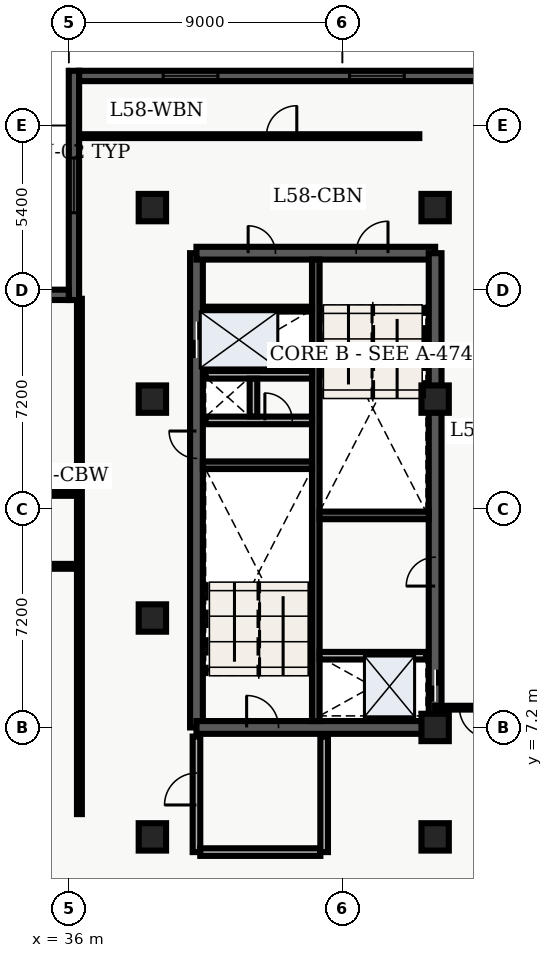
"""IFC4 building model, lengths in metres.
Left out: names, types, materials, properties, quantities, classifications, styles, units other than length and angle.
Written with IfcOpenShell. Run it as: python <this file> out.ifc"""

import sys

from ifc_helpers import new_model, entity, si_unit, converted_unit, direction, frame, origin_with_axes, origin_2d_with_axis, place, context, subcontext, project, spatial, polyline, rectangle, outline, extrude, element, fill, save


model = new_model("IFC4")
c1 = context("Model", 3, precision=1e-05, world=origin_with_axes(), true_north=direction((0.0, 1.0)))
c2 = subcontext(c1, "Body", "Model", "MODEL_VIEW")
j1 = project(units=[si_unit("LENGTHUNIT", "METRE"), converted_unit("PLANEANGLEUNIT", "DEGREE", entity("IfcPlaneAngleMeasure", 0.017), si_unit("PLANEANGLEUNIT", "RADIAN"), dimensions=[0, 0, 0, 0, 0, 0, 0])], contexts=[c1])
p1 = place(None, origin_with_axes())
s1 = spatial("IfcSite", under=j1, at=p1, CompositionType="ELEMENT")
p2 = place(p1, origin_with_axes())
s2 = spatial("IfcBuilding", under=s1, at=p2, CompositionType="ELEMENT")
p3 = place(p2, frame((0.0, 0.0, 236.4), z_axis=(0.0, 0.0, 1.0), x_axis=(1.0, 0.0, 0.0)))
s3 = spatial("IfcBuildingStorey", under=s2, at=p3, CompositionType="ELEMENT", Elevation=236.4)
p4 = place(p3, frame((40.2, 7.2, 0.0), z_axis=(0.0, 0.0, 1.0), x_axis=(0.0, 1.0, 0.0)))
e1 = element("IfcWall", 1, at=p4, inside=s3, PredefinedType="SHEAR", context=c2, shape_type="SweptSolid", body=[
    extrude(outline(polyline([(0.0, -0.21), (15.6, -0.21), (15.6, 0.21), (0.0, 0.21), (0.0, -0.21)])), origin_with_axes(), (0.0, 0.0, 1.0), 3.66),
])
p5 = place(p4, frame((12.75, 0.0, 0.0), z_axis=(0.0, 0.0, 1.0), x_axis=(1.0, 0.0, 0.0)))
e2 = element("IfcOpeningElement", 2, at=p5, cuts=e1, PredefinedType="OPENING", context=c2, shape_type="SweptSolid", body=[
    extrude(rectangle(XDim=1.2, YDim=0.44, at=origin_2d_with_axis()), origin_with_axes(), (0.0, 0.0, 1.0), 2.15),
])
p6 = place(p4, frame((9.3, 0.0, 0.0), z_axis=(0.0, 0.0, 1.0), x_axis=(1.0, 0.0, 0.0)))
e3 = element("IfcOpeningElement", 3, at=p6, cuts=e1, PredefinedType="OPENING", context=c2, shape_type="SweptSolid", body=[
    extrude(rectangle(XDim=0.9, YDim=0.44, at=origin_2d_with_axis()), origin_with_axes(), (0.0, 0.0, 1.0), 2.15),
])
p7 = place(p3, frame((40.2, 7.2, 0.0), z_axis=(0.0, 0.0, 1.0), x_axis=(1.0, 0.0, 0.0)))
e4 = element("IfcWall", 4, at=p7, inside=s3, PredefinedType="SHEAR", context=c2, shape_type="SweptSolid", body=[
    extrude(outline(polyline([(0.0, -0.21), (7.85, -0.21), (7.85, 0.21), (0.0, 0.21), (0.0, -0.21)])), origin_with_axes(), (0.0, 0.0, 1.0), 3.66),
])
p8 = place(p7, frame((2.175, 0.0, 0.0), z_axis=(0.0, 0.0, 1.0), x_axis=(1.0, 0.0, 0.0)))
e5 = element("IfcOpeningElement", 5, at=p8, cuts=e4, PredefinedType="OPENING", context=c2, shape_type="SweptSolid", body=[
    extrude(rectangle(XDim=1.05, YDim=0.44, at=origin_2d_with_axis()), origin_with_axes(), (0.0, 0.0, 1.0), 2.15),
])
p9 = place(p3, frame((40.2, 22.8, 0.0), z_axis=(0.0, 0.0, 1.0), x_axis=(1.0, 0.0, 0.0)))
e6 = element("IfcWall", 6, at=p9, inside=s3, PredefinedType="SHEAR", context=c2, shape_type="SweptSolid", body=[
    extrude(outline(polyline([(0.0, -0.21), (7.85, -0.21), (7.85, 0.21), (0.0, 0.21), (0.0, -0.21)])), origin_with_axes(), (0.0, 0.0, 1.0), 3.66),
])
p10 = place(p9, frame((5.775, 0.0, 0.0), z_axis=(0.0, 0.0, 1.0), x_axis=(1.0, 0.0, 0.0)))
e7 = element("IfcOpeningElement", 7, at=p10, cuts=e6, PredefinedType="OPENING", context=c2, shape_type="SweptSolid", body=[
    extrude(rectangle(XDim=1.05, YDim=0.44, at=origin_2d_with_axis()), origin_with_axes(), (0.0, 0.0, 1.0), 2.15),
])
p11 = place(p9, frame((2.15, 0.0, 0.0), z_axis=(0.0, 0.0, 1.0), x_axis=(1.0, 0.0, 0.0)))
e8 = element("IfcOpeningElement", 8, at=p11, cuts=e6, PredefinedType="OPENING", context=c2, shape_type="SweptSolid", body=[
    extrude(rectangle(XDim=0.9, YDim=0.44, at=origin_2d_with_axis()), origin_with_axes(), (0.0, 0.0, 1.0), 2.15),
])
p12 = place(p3, frame((48.05, 7.2, 0.0), z_axis=(0.0, 0.0, 1.0), x_axis=(0.0, 1.0, 0.0)))
e9 = element("IfcWall", 9, at=p12, inside=s3, PredefinedType="SHEAR", context=c2, shape_type="SweptSolid", body=[
    extrude(outline(polyline([(0.0, -0.21), (15.6, -0.21), (15.6, 0.21), (0.0, 0.21), (0.0, -0.21)])), origin_with_axes(), (0.0, 0.0, 1.0), 3.66),
])
p13 = place(p12, frame((1.375, 0.0, 0.0), z_axis=(0.0, 0.0, 1.0), x_axis=(1.0, 0.0, 0.0)))
e10 = element("IfcOpeningElement", 10, at=p13, cuts=e9, PredefinedType="OPENING", context=c2, shape_type="SweptSolid", body=[
    extrude(rectangle(XDim=1.05, YDim=0.44, at=origin_2d_with_axis()), origin_with_axes(), (0.0, 0.0, 1.0), 2.15),
])
p14 = place(p12, frame((5.125, 0.0, 0.0), z_axis=(0.0, 0.0, 1.0), x_axis=(1.0, 0.0, 0.0)))
e11 = element("IfcOpeningElement", 11, at=p14, cuts=e9, PredefinedType="OPENING", context=c2, shape_type="SweptSolid", body=[
    extrude(rectangle(XDim=0.95, YDim=0.44, at=origin_2d_with_axis()), origin_with_axes(), (0.0, 0.0, 1.0), 2.15),
])
p15 = place(p3, frame((44.125, 7.41, 0.0), z_axis=(0.0, 0.0, 1.0), x_axis=(0.0, 1.0, 0.0)))
e12 = element("IfcWall", 12, at=p15, inside=s3, PredefinedType="SHEAR", context=c2, shape_type="SweptSolid", body=[
    extrude(outline(polyline([(0.0, -0.125), (15.18, -0.125), (15.18, 0.125), (0.0, 0.125), (0.0, -0.125)])), origin_with_axes(), (0.0, 0.0, 1.0), 3.66),
])
for number, where, z_axis, x_axis in (
    (13, (40.41, 15.825, 0.0), (0.0, 0.0, 1.0), (1.0, 0.0, 0.0)),
    (14, (44.25, 14.175, 0.0), (0.0, 0.0, 1.0), (1.0, 0.0, 0.0)),
):
    element("IfcWall", number, at=place(p3, frame(where, z_axis=z_axis, x_axis=x_axis)), inside=s3, PredefinedType="SHEAR", context=c2, shape_type="SweptSolid", body=[
        extrude(outline(polyline([(0.0, -0.125), (3.59, -0.125), (3.59, 0.125), (0.0, 0.125), (0.0, -0.125)])), origin_with_axes(), (0.0, 0.0, 1.0), 3.66),
    ])
p16 = place(p3, frame((40.5, 17.3, 0.0), z_axis=(0.0, 0.0, 1.0), x_axis=(1.0, 0.0, 0.0)))
e15 = element("IfcWall", 15, at=p16, inside=s3, PredefinedType="SOLIDWALL", context=c2, shape_type="SweptSolid", body=[
    extrude(outline(polyline([(0.0, -0.125), (3.5, -0.125), (3.5, 0.125), (0.0, 0.125), (0.0, -0.125)])), origin_with_axes(), (0.0, 0.0, 1.0), 2.7),
])
p17 = place(p16, frame((2.4, 0.0, 0.0), z_axis=(0.0, 0.0, 1.0), x_axis=(1.0, 0.0, 0.0)))
e16 = element("IfcOpeningElement", 16, at=p17, cuts=e15, PredefinedType="OPENING", context=c2, shape_type="SweptSolid", body=[
    extrude(rectangle(XDim=0.9, YDim=0.27, at=origin_2d_with_axis()), origin_with_axes(), (0.0, 0.0, 1.0), 2.15),
])
p18 = place(p3, frame((40.5, 18.8, 0.0), z_axis=(0.0, 0.0, 1.0), x_axis=(1.0, 0.0, 0.0)))
e17 = element("IfcWall", 17, at=p18, inside=s3, PredefinedType="SOLIDWALL", context=c2, shape_type="SweptSolid", body=[
    extrude(outline(polyline([(0.0, -0.125), (3.5, -0.125), (3.5, 0.125), (0.0, 0.125), (0.0, -0.125)])), origin_with_axes(), (0.0, 0.0, 1.0), 2.7),
])
p19 = place(p3, frame((42.075, 17.43, 0.0), z_axis=(0.0, 0.0, 1.0), x_axis=(0.0, 1.0, 0.0)))
e18 = element("IfcWall", 18, at=p19, inside=s3, PredefinedType="SOLIDWALL", context=c2, shape_type="SweptSolid", body=[
    extrude(outline(polyline([(0.0, -0.125), (1.24, -0.125), (1.24, 0.125), (0.0, 0.125), (0.0, -0.125)])), origin_with_axes(), (0.0, 0.0, 1.0), 2.7),
])
p20 = place(p3, frame((40.2, 3.1, 0.0), z_axis=(0.0, 0.0, 1.0), x_axis=(0.0, 1.0, 0.0)))
e19 = element("IfcWall", 19, at=p20, inside=s3, PredefinedType="SOLIDWALL", context=c2, shape_type="SweptSolid", body=[
    extrude(outline(polyline([(0.0, -0.125), (3.8, -0.125), (3.8, 0.125), (0.0, 0.125), (0.0, -0.125)])), origin_with_axes(), (0.0, 0.0, 1.0), 2.7),
])
p21 = place(p20, frame((2.075, 0.0, 0.0), z_axis=(0.0, 0.0, 1.0), x_axis=(1.0, 0.0, 0.0)))
e20 = element("IfcOpeningElement", 20, at=p21, cuts=e19, PredefinedType="OPENING", context=c2, shape_type="SweptSolid", body=[
    extrude(rectangle(XDim=1.05, YDim=0.27, at=origin_2d_with_axis()), origin_with_axes(), (0.0, 0.0, 1.0), 2.15),
])
p22 = place(p3, frame((40.325, 3.1, 0.0), z_axis=(0.0, 0.0, 1.0), x_axis=(1.0, 0.0, 0.0)))
e21 = element("IfcWall", 21, at=p22, inside=s3, PredefinedType="SOLIDWALL", context=c2, shape_type="SweptSolid", body=[
    extrude(outline(polyline([(0.0, -0.125), (3.95, -0.125), (3.95, 0.125), (0.0, 0.125), (0.0, -0.125)])), origin_with_axes(), (0.0, 0.0, 1.0), 2.7),
])
p23 = place(p3, frame((44.4, 3.1, 0.0), z_axis=(0.0, 0.0, 1.0), x_axis=(0.0, 1.0, 0.0)))
e22 = element("IfcWall", 22, at=p23, inside=s3, PredefinedType="SOLIDWALL", context=c2, shape_type="SweptSolid", body=[
    extrude(outline(polyline([(0.0, -0.125), (3.8, -0.125), (3.8, 0.125), (0.0, 0.125), (0.0, -0.125)])), origin_with_axes(), (0.0, 0.0, 1.0), 2.7),
])
for number, where, z_axis, x_axis in (
    (23, (38.75, 3.6, 0.0), (0.0, 0.0, 1.0), (1.0, 0.0, 0.0)),
    (24, (38.75, 10.8, 0.0), (0.0, 0.0, 1.0), (1.0, 0.0, 0.0)),
    (25, (38.75, 18.0, 0.0), (0.0, 0.0, 1.0), (1.0, 0.0, 0.0)),
    (26, (38.75, 24.3, 0.0), (0.0, 0.0, 1.0), (1.0, 0.0, 0.0)),
    (27, (48.05, 3.6, 0.0), (0.0, 0.0, 1.0), (1.0, 0.0, 0.0)),
    (28, (48.05, 7.2, 0.0), (0.0, 0.0, 1.0), (1.0, 0.0, 0.0)),
    (29, (48.05, 18.0, 0.0), (0.0, 0.0, 1.0), (1.0, 0.0, 0.0)),
    (30, (48.05, 24.3, 0.0), (0.0, 0.0, 1.0), (1.0, 0.0, 0.0)),
):
    element("IfcColumn", number, at=place(p3, frame(where, z_axis=z_axis, x_axis=x_axis)), inside=s3, PredefinedType="COLUMN", context=c2, shape_type="SweptSolid", body=[
        extrude(rectangle(XDim=0.9, YDim=0.9, at=origin_2d_with_axis()), origin_with_axes(), (0.0, 0.0, 1.0), 3.9),
    ])
p24 = place(p3, frame((40.5, 20.96, 0.0), z_axis=(0.0, 0.0, 1.0), x_axis=(1.0, 0.0, 0.0)))
e31 = element("IfcWall", 31, at=p24, inside=s3, PredefinedType="PARTITIONING", context=c2, shape_type="SweptSolid", body=[
    extrude(outline(polyline([(0.0, -0.08), (3.5, -0.08), (3.5, 0.08), (0.0, 0.08), (0.0, -0.08)])), origin_with_axes(), (0.0, 0.0, 1.0), 2.7),
])
p25 = place(p3, frame((44.25, 9.56, 0.0), z_axis=(0.0, 0.0, 1.0), x_axis=(1.0, 0.0, 0.0)))
e32 = element("IfcWall", 32, at=p25, inside=s3, PredefinedType="SOLIDWALL", context=c2, shape_type="SweptSolid", body=[
    extrude(outline(polyline([(0.0, -0.125), (3.5, -0.125), (3.5, 0.125), (0.0, 0.125), (0.0, -0.125)])), origin_with_axes(), (0.0, 0.0, 1.0), 2.7),
])
p26 = place(p3, frame((20.3, 12.5, 0.0), z_axis=(0.0, 0.0, 1.0), x_axis=(1.0, 0.0, 0.0)))
e33 = element("IfcWall", 33, at=p26, inside=s3, PredefinedType="PARTITIONING", context=c2, shape_type="SweptSolid", body=[
    extrude(outline(polyline([(0.0, -0.08), (16.05, -0.08), (16.05, 0.08), (0.0, 0.08), (0.0, -0.08)])), origin_with_axes(), (0.0, 0.0, 1.0), 2.7),
])
p27 = place(p26, frame((3.865, 0.0, 0.0), z_axis=(0.0, 0.0, 1.0), x_axis=(1.0, 0.0, 0.0)))
e34 = element("IfcOpeningElement", 34, at=p27, cuts=e33, PredefinedType="OPENING", context=c2, shape_type="SweptSolid", body=[
    extrude(rectangle(XDim=1.2, YDim=0.18, at=origin_2d_with_axis()), origin_with_axes(), (0.0, 0.0, 1.0), 2.2),
])
p28 = place(p26, frame((9.48, 0.0, 0.0), z_axis=(0.0, 0.0, 1.0), x_axis=(1.0, 0.0, 0.0)))
e35 = element("IfcOpeningElement", 35, at=p28, cuts=e33, PredefinedType="OPENING", context=c2, shape_type="SweptSolid", body=[
    extrude(rectangle(XDim=1.0, YDim=0.18, at=origin_2d_with_axis()), origin_with_axes(), (0.0, 0.0, 1.0), 2.15),
])
p29 = place(p26, frame((13.691, 0.0, 0.0), z_axis=(0.0, 0.0, 1.0), x_axis=(1.0, 0.0, 0.0)))
e36 = element("IfcOpeningElement", 36, at=p29, cuts=e33, PredefinedType="OPENING", context=c2, shape_type="SweptSolid", body=[
    extrude(rectangle(XDim=1.0, YDim=0.18, at=origin_2d_with_axis()), origin_with_axes(), (0.0, 0.0, 1.0), 2.15),
])
p30 = place(p3, frame((20.3, 14.9, 0.0), z_axis=(0.0, 0.0, 1.0), x_axis=(1.0, 0.0, 0.0)))
e37 = element("IfcWall", 37, at=p30, inside=s3, PredefinedType="PARTITIONING", context=c2, shape_type="SweptSolid", body=[
    extrude(outline(polyline([(0.0, -0.08), (16.05, -0.08), (16.05, 0.08), (0.0, 0.08), (0.0, -0.08)])), origin_with_axes(), (0.0, 0.0, 1.0), 2.7),
])
p31 = place(p30, frame((8.075, 0.0, 0.0), z_axis=(0.0, 0.0, 1.0), x_axis=(1.0, 0.0, 0.0)))
e38 = element("IfcOpeningElement", 38, at=p31, cuts=e37, PredefinedType="OPENING", context=c2, shape_type="SweptSolid", body=[
    extrude(rectangle(XDim=1.2, YDim=0.18, at=origin_2d_with_axis()), origin_with_axes(), (0.0, 0.0, 1.0), 2.2),
])
p32 = place(p3, frame((36.35, 4.35, 0.0), z_axis=(0.0, 0.0, 1.0), x_axis=(0.0, 1.0, 0.0)))
e39 = element("IfcWall", 39, at=p32, inside=s3, PredefinedType="PARTITIONING", context=c2, shape_type="SweptSolid", body=[
    extrude(outline(polyline([(0.0, -0.08), (16.95, -0.08), (16.95, 0.08), (0.0, 0.08), (0.0, -0.08)])), origin_with_axes(), (0.0, 0.0, 1.0), 2.7),
])
p33 = place(p3, frame((51.865, 7.85, 0.0), z_axis=(0.0, 0.0, 1.0), x_axis=(-1.0, 0.0, 0.0)))
e40 = element("IfcWall", 40, at=p33, inside=s3, PredefinedType="PARTITIONING", context=c2, shape_type="SweptSolid", body=[
    extrude(outline(polyline([(0.0, -0.062), (3.815, -0.062), (3.815, 0.062), (0.0, 0.062), (0.0, -0.062)])), origin_with_axes(), (0.0, 0.0, 1.0), 2.7),
])
p34 = place(p33, frame((2.515, 0.0, 0.0), z_axis=(0.0, 0.0, 1.0), x_axis=(1.0, 0.0, 0.0)))
e41 = element("IfcOpeningElement", 41, at=p34, cuts=e40, PredefinedType="OPENING", context=c2, shape_type="SweptSolid", body=[
    extrude(rectangle(XDim=1.0, YDim=0.145, at=origin_2d_with_axis()), origin_with_axes(), (0.0, 0.0, 1.0), 2.15),
])
p35 = place(p3, frame((36.335, 26.65, 0.0), z_axis=(0.0, 0.0, 1.0), x_axis=(1.0, 0.0, 0.0)))
e42 = element("IfcWall", 42, at=p35, inside=s3, PredefinedType="PARTITIONING", context=c2, shape_type="SweptSolid", body=[
    extrude(outline(polyline([(0.0, -0.062), (11.195, -0.062), (11.195, 0.062), (0.0, 0.062), (0.0, -0.062)])), origin_with_axes(), (0.0, 0.0, 1.0), 2.7),
])
p36 = place(p35, frame((6.665, 0.0, 0.0), z_axis=(0.0, 0.0, 1.0), x_axis=(1.0, 0.0, 0.0)))
e43 = element("IfcOpeningElement", 43, at=p36, cuts=e42, PredefinedType="OPENING", context=c2, shape_type="SweptSolid", body=[
    extrude(rectangle(XDim=1.0, YDim=0.145, at=origin_2d_with_axis()), origin_with_axes(), (0.0, 0.0, 1.0), 2.15),
])
p37 = place(p3, frame((36.17, 21.26, 0.0), z_axis=(0.0, 0.0, 1.0), x_axis=(0.0, 1.0, 0.0)))
e44 = element("IfcWall", 44, at=p37, inside=s3, PredefinedType="SOLIDWALL", context=c2, shape_type="SweptSolid", body=[
    extrude(outline(polyline([(0.0, -0.17), (7.54, -0.17), (7.54, 0.17), (0.0, 0.17), (0.0, -0.17)])), origin_with_axes(), (0.0, 0.0, 1.0), 3.66),
])
p38 = place(p37, frame((3.77, 0.0, 0.45), z_axis=(0.0, 0.0, 1.0), x_axis=(1.0, 0.0, 0.0)))
e45 = element("IfcOpeningElement", 45, at=p38, cuts=e44, PredefinedType="OPENING", context=c2, shape_type="SweptSolid", body=[
    extrude(rectangle(XDim=1.8, YDim=0.36, at=origin_2d_with_axis()), origin_with_axes(), (0.0, 0.0, 1.0), 2.1),
])
p39 = place(p3, frame((36.34, 28.63, 0.0), z_axis=(0.0, 0.0, 1.0), x_axis=(1.0, 0.0, 0.0)))
e46 = element("IfcWall", 46, at=p39, inside=s3, PredefinedType="SOLIDWALL", context=c2, shape_type="SweptSolid", body=[
    extrude(outline(polyline([(0.0, -0.17), (13.46, -0.17), (13.46, 0.17), (0.0, 0.17), (0.0, -0.17)])), origin_with_axes(), (0.0, 0.0, 1.0), 3.66),
])
p40 = place(p39, frame((3.665, 0.0, 0.45), z_axis=(0.0, 0.0, 1.0), x_axis=(1.0, 0.0, 0.0)))
e47 = element("IfcOpeningElement", 47, at=p40, cuts=e46, PredefinedType="OPENING", context=c2, shape_type="SweptSolid", body=[
    extrude(rectangle(XDim=1.8, YDim=0.36, at=origin_2d_with_axis()), origin_with_axes(), (0.0, 0.0, 1.0), 2.1),
])
p41 = place(p39, frame((9.795, 0.0, 0.45), z_axis=(0.0, 0.0, 1.0), x_axis=(1.0, 0.0, 0.0)))
e48 = element("IfcOpeningElement", 48, at=p41, cuts=e46, PredefinedType="OPENING", context=c2, shape_type="SweptSolid", body=[
    extrude(rectangle(XDim=1.8, YDim=0.36, at=origin_2d_with_axis()), origin_with_axes(), (0.0, 0.0, 1.0), 2.1),
])
p42 = place(p3, frame((32.06, 21.43, 0.0), z_axis=(0.0, 0.0, 1.0), x_axis=(1.0, 0.0, 0.0)))
e49 = element("IfcWall", 49, at=p42, inside=s3, PredefinedType="SOLIDWALL", context=c2, shape_type="SweptSolid", body=[
    extrude(outline(polyline([(0.0, -0.17), (3.94, -0.17), (3.94, 0.17), (0.0, 0.17), (0.0, -0.17)])), origin_with_axes(), (0.0, 0.0, 1.0), 3.66),
])
p43 = place(p12, frame((1.375, 0.0, 0.0), z_axis=(0.0, 0.0, 1.0), x_axis=(1.0, 0.0, 0.0)))
e50 = element("IfcDoor", 50, at=p43, inside=s3, OperationType="SLIDING_TO_LEFT", PredefinedType="DOOR", context=c2, shape_type="SweptSolid", body=[
    extrude(rectangle(XDim=1.05, YDim=0.09, at=origin_2d_with_axis()), origin_with_axes(), (0.0, 0.0, 1.0), 2.15),
])
fill(e10, e50)
p44 = place(p4, frame((12.75, 0.0, 0.0), z_axis=(0.0, 0.0, 1.0), x_axis=(1.0, 0.0, 0.0)))
e51 = element("IfcDoor", 51, at=p44, inside=s3, OperationType="DOUBLE_DOOR_SLIDING", PredefinedType="DOOR", context=c2, shape_type="SweptSolid", body=[
    extrude(rectangle(XDim=1.2, YDim=0.09, at=origin_2d_with_axis()), origin_with_axes(), (0.0, 0.0, 1.0), 2.15),
])
fill(e2, e51)
p45 = place(p4, frame((9.3, 0.0, 0.0), z_axis=(0.0, 0.0, 1.0), x_axis=(1.0, 0.0, 0.0)))
e52 = element("IfcDoor", 52, at=p45, inside=s3, OperationType="SINGLE_SWING_RIGHT", PredefinedType="DOOR", context=c2, shape_type="SweptSolid", body=[
    extrude(rectangle(XDim=0.9, YDim=0.09, at=origin_2d_with_axis()), origin_with_axes(), (0.0, 0.0, 1.0), 2.15),
])
fill(e3, e52)
p46 = place(p16, frame((2.4, 0.0, 0.0), z_axis=(0.0, 0.0, 1.0), x_axis=(1.0, 0.0, 0.0)))
e53 = element("IfcDoor", 53, at=p46, inside=s3, OperationType="SINGLE_SWING_LEFT", PredefinedType="DOOR", context=c2, shape_type="SweptSolid", body=[
    extrude(rectangle(XDim=0.9, YDim=0.09, at=origin_2d_with_axis()), origin_with_axes(), (0.0, 0.0, 1.0), 2.15),
])
fill(e16, e53)
p47 = place(p7, frame((2.175, 0.0, 0.0), z_axis=(0.0, 0.0, 1.0), x_axis=(1.0, 0.0, 0.0)))
e54 = element("IfcDoor", 54, at=p47, inside=s3, OperationType="SINGLE_SWING_LEFT", PredefinedType="DOOR", context=c2, shape_type="SweptSolid", body=[
    extrude(rectangle(XDim=1.05, YDim=0.09, at=origin_2d_with_axis()), origin_with_axes(), (0.0, 0.0, 1.0), 2.15),
])
fill(e5, e54)
p48 = place(p9, frame((5.775, 0.0, 0.0), z_axis=(0.0, 0.0, 1.0), x_axis=(1.0, 0.0, 0.0)))
e55 = element("IfcDoor", 55, at=p48, inside=s3, OperationType="SINGLE_SWING_RIGHT", PredefinedType="DOOR", context=c2, shape_type="SweptSolid", body=[
    extrude(rectangle(XDim=1.05, YDim=0.09, at=origin_2d_with_axis()), origin_with_axes(), (0.0, 0.0, 1.0), 2.15),
])
fill(e7, e55)
p49 = place(p20, frame((2.075, 0.0, 0.0), z_axis=(0.0, 0.0, 1.0), x_axis=(1.0, 0.0, 0.0)))
e56 = element("IfcDoor", 56, at=p49, inside=s3, OperationType="SINGLE_SWING_LEFT", PredefinedType="DOOR", context=c2, shape_type="SweptSolid", body=[
    extrude(rectangle(XDim=1.05, YDim=0.09, at=origin_2d_with_axis()), origin_with_axes(), (0.0, 0.0, 1.0), 2.15),
])
fill(e20, e56)
p50 = place(p9, frame((2.15, 0.0, 0.0), z_axis=(0.0, 0.0, 1.0), x_axis=(1.0, 0.0, 0.0)))
e57 = element("IfcDoor", 57, at=p50, inside=s3, OperationType="SINGLE_SWING_LEFT", PredefinedType="DOOR", context=c2, shape_type="SweptSolid", body=[
    extrude(rectangle(XDim=0.9, YDim=0.09, at=origin_2d_with_axis()), origin_with_axes(), (0.0, 0.0, 1.0), 2.15),
])
fill(e8, e57)
p51 = place(p12, frame((5.125, 0.0, 0.0), z_axis=(0.0, 0.0, 1.0), x_axis=(1.0, 0.0, 0.0)))
e58 = element("IfcDoor", 58, at=p51, inside=s3, OperationType="SINGLE_SWING_LEFT", PredefinedType="DOOR", context=c2, shape_type="SweptSolid", body=[
    extrude(rectangle(XDim=0.95, YDim=0.09, at=origin_2d_with_axis()), origin_with_axes(), (0.0, 0.0, 1.0), 2.15),
])
fill(e11, e58)
p52 = place(p33, frame((2.515, 0.0, 0.0), z_axis=(0.0, 0.0, 1.0), x_axis=(1.0, 0.0, 0.0)))
e59 = element("IfcDoor", 59, at=p52, inside=s3, OperationType="SINGLE_SWING_LEFT", PredefinedType="DOOR", context=c2, shape_type="SweptSolid", body=[
    extrude(rectangle(XDim=1.0, YDim=0.075, at=origin_2d_with_axis()), origin_with_axes(), (0.0, 0.0, 1.0), 2.15),
])
fill(e41, e59)
p53 = place(p35, frame((6.665, 0.0, 0.0), z_axis=(0.0, 0.0, 1.0), x_axis=(1.0, 0.0, 0.0)))
e60 = element("IfcDoor", 60, at=p53, inside=s3, OperationType="SINGLE_SWING_RIGHT", PredefinedType="DOOR", context=c2, shape_type="SweptSolid", body=[
    extrude(rectangle(XDim=1.0, YDim=0.075, at=origin_2d_with_axis()), origin_with_axes(), (0.0, 0.0, 1.0), 2.15),
])
fill(e43, e60)
p54 = place(p37, frame((3.77, 0.0, 0.45), z_axis=(0.0, 0.0, 1.0), x_axis=(1.0, 0.0, 0.0)))
e61 = element("IfcWindow", 61, at=p54, inside=s3, PredefinedType="WINDOW", context=c2, shape_type="SweptSolid", body=[
    extrude(rectangle(XDim=1.8, YDim=0.09, at=origin_2d_with_axis()), origin_with_axes(), (0.0, 0.0, 1.0), 2.1),
])
fill(e45, e61)
p55 = place(p39, frame((3.665, 0.0, 0.45), z_axis=(0.0, 0.0, 1.0), x_axis=(1.0, 0.0, 0.0)))
e62 = element("IfcWindow", 62, at=p55, inside=s3, PredefinedType="WINDOW", context=c2, shape_type="SweptSolid", body=[
    extrude(rectangle(XDim=1.8, YDim=0.09, at=origin_2d_with_axis()), origin_with_axes(), (0.0, 0.0, 1.0), 2.1),
])
fill(e47, e62)
p56 = place(p39, frame((9.795, 0.0, 0.45), z_axis=(0.0, 0.0, 1.0), x_axis=(1.0, 0.0, 0.0)))
e63 = element("IfcWindow", 63, at=p56, inside=s3, PredefinedType="WINDOW", context=c2, shape_type="SweptSolid", body=[
    extrude(rectangle(XDim=1.8, YDim=0.09, at=origin_2d_with_axis()), origin_with_axes(), (0.0, 0.0, 1.0), 2.1),
])
fill(e48, e63)
save(model, sys.argv[1])
